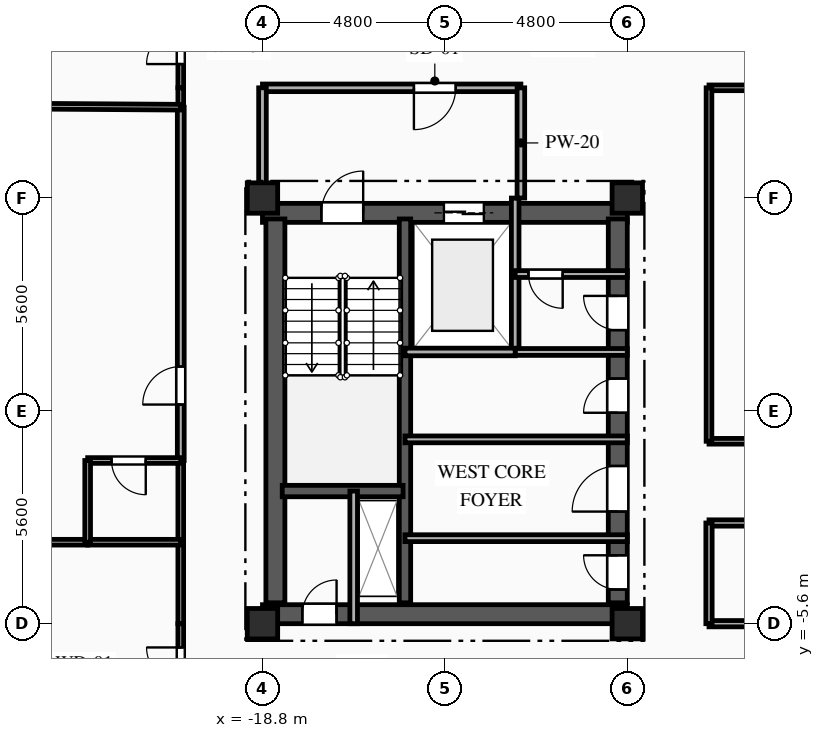
"""IFC4 building model, lengths in metres.
Left out: names, types, materials, properties, quantities, classifications, styles, units other than length and angle.
Written with IfcOpenShell. Run it as: python <this file> out.ifc"""

import sys

from ifc_helpers import new_model, si_unit, direction, frame, frame_2d, origin, origin_2d, place, context, subcontext, project, spatial, rectangle, extrude, element, fill, save


model = new_model("IFC4")
c1 = context("Model", 3, precision=1e-05, world=origin(), true_north=direction((0.0, 1.0)))
c2 = subcontext(c1, "Body", "Model", "MODEL_VIEW")
j1 = project(units=[si_unit("LENGTHUNIT", "METRE"), si_unit("PLANEANGLEUNIT", "RADIAN")], contexts=[c1])
p1 = place(None, origin())
s1 = spatial("IfcSite", under=j1, at=p1, CompositionType="ELEMENT")
p2 = place(p1, origin())
s2 = spatial("IfcBuilding", under=s1, at=p2, CompositionType="ELEMENT")
p3 = place(p2, frame((0.0, 0.0, 209.8)))
s3 = spatial("IfcBuildingStorey", under=s2, at=p3, CompositionType="ELEMENT", Elevation=209.8)
for number, where, z_axis, x_axis in (
    (1, (-18.8, -5.6, 0.0), (0.0, 0.0, 1.0), (1.0, 0.0, 0.0)),
    (2, (-18.8, 5.6, 0.0), (0.0, 0.0, 1.0), (1.0, 0.0, 0.0)),
    (3, (-9.2, -5.6, 0.0), (0.0, 0.0, 1.0), (1.0, 0.0, 0.0)),
    (4, (-9.2, 5.6, 0.0), (0.0, 0.0, 1.0), (1.0, 0.0, 0.0)),
):
    element("IfcColumn", number, at=place(p3, frame(where, z_axis=z_axis, x_axis=x_axis)), inside=s3, PredefinedType="COLUMN", context=c2, shape_type="SweptSolid", body=[
        extrude(rectangle(XDim=0.8, YDim=0.8, at=origin_2d()), origin(), (0.0, 0.0, 1.0), 3.35),
    ])
p4 = place(p3, frame((-18.8, 5.21, 0.0), z_axis=(0.0, 0.0, 1.0), x_axis=(1.0, 0.0, 0.0)))
e5 = element("IfcWall", 5, at=p4, inside=s3, PredefinedType="SHEAR", context=c2, shape_type="SweptSolid", body=[
    extrude(rectangle(XDim=9.6, YDim=0.5, at=frame_2d((4.8, 0.0))), origin(), (0.0, 0.0, 1.0), 3.04),
])
p5 = place(p4, frame((1.55, 0.0, 0.0)))
e6 = element("IfcOpeningElement", 6, at=p5, cuts=e5, PredefinedType="OPENING", context=c2, shape_type="SweptSolid", body=[
    extrude(rectangle(XDim=1.1, YDim=2.15, at=frame_2d((0.55, 1.075))), frame((0.0, 0.26, 0.0), z_axis=(0.0, -1.0, 0.0), x_axis=(1.0, 0.0, 0.0)), (0.0, 0.0, 1.0), 0.52),
])
p6 = place(p4, frame((4.775, 0.0, 0.0)))
e7 = element("IfcOpeningElement", 7, at=p6, cuts=e5, PredefinedType="OPENING", context=c2, shape_type="SweptSolid", body=[
    extrude(rectangle(XDim=1.05, YDim=2.1, at=frame_2d((0.525, 1.05))), frame((0.0, 0.26, 0.0), z_axis=(0.0, -1.0, 0.0), x_axis=(1.0, 0.0, 0.0)), (0.0, 0.0, 1.0), 0.52),
])
p7 = place(p3, frame((-18.8, -5.35, 0.0), z_axis=(0.0, 0.0, 1.0), x_axis=(1.0, 0.0, 0.0)))
e8 = element("IfcWall", 8, at=p7, inside=s3, PredefinedType="SHEAR", context=c2, shape_type="SweptSolid", body=[
    extrude(rectangle(XDim=9.6, YDim=0.5, at=frame_2d((4.8, 0.0))), origin(), (0.0, 0.0, 1.0), 3.04),
])
p8 = place(p7, frame((1.05, 0.0, 0.0)))
e9 = element("IfcOpeningElement", 9, at=p8, cuts=e8, PredefinedType="OPENING", context=c2, shape_type="SweptSolid", body=[
    extrude(rectangle(XDim=0.9, YDim=2.1, at=frame_2d((0.45, 1.05))), frame((0.0, 0.26, 0.0), z_axis=(0.0, -1.0, 0.0), x_axis=(1.0, 0.0, 0.0)), (0.0, 0.0, 1.0), 0.52),
])
p9 = place(p3, frame((-18.46, -5.05, 0.0), z_axis=(0.0, 0.0, 1.0), x_axis=(0.0, 1.0, 0.0)))
e10 = element("IfcWall", 10, at=p9, inside=s3, PredefinedType="SHEAR", context=c2, shape_type="SweptSolid", body=[
    extrude(rectangle(XDim=10.1, YDim=0.5, at=frame_2d((5.05, 0.0))), origin(), (0.0, 0.0, 1.0), 3.04),
])
p10 = place(p3, frame((-9.45, -5.05, 0.0), z_axis=(0.0, 0.0, 1.0), x_axis=(0.0, 1.0, 0.0)))
e11 = element("IfcWall", 11, at=p10, inside=s3, PredefinedType="SHEAR", context=c2, shape_type="SweptSolid", body=[
    extrude(rectangle(XDim=10.1, YDim=0.5, at=frame_2d((5.05, 0.0))), origin(), (0.0, 0.0, 1.0), 3.04),
])
p11 = place(p10, frame((7.175, 0.0, 0.0)))
e12 = element("IfcOpeningElement", 12, at=p11, cuts=e11, PredefinedType="OPENING", context=c2, shape_type="SweptSolid", body=[
    extrude(rectangle(XDim=0.9, YDim=2.1, at=frame_2d((0.45, 1.05))), frame((0.0, 0.26, 0.0), z_axis=(0.0, -1.0, 0.0), x_axis=(1.0, 0.0, 0.0)), (0.0, 0.0, 1.0), 0.52),
])
p12 = place(p10, frame((2.4, 0.0, 0.0)))
e13 = element("IfcOpeningElement", 13, at=p12, cuts=e11, PredefinedType="OPENING", context=c2, shape_type="SweptSolid", body=[
    extrude(rectangle(XDim=1.2, YDim=2.15, at=frame_2d((0.6, 1.075))), frame((0.0, 0.26, 0.0), z_axis=(0.0, -1.0, 0.0), x_axis=(1.0, 0.0, 0.0)), (0.0, 0.0, 1.0), 0.52),
])
p13 = place(p10, frame((0.35, 0.0, 0.0)))
e14 = element("IfcOpeningElement", 14, at=p13, cuts=e11, PredefinedType="OPENING", context=c2, shape_type="SweptSolid", body=[
    extrude(rectangle(XDim=0.9, YDim=2.1, at=frame_2d((0.45, 1.05))), frame((0.0, 0.26, 0.0), z_axis=(0.0, -1.0, 0.0), x_axis=(1.0, 0.0, 0.0)), (0.0, 0.0, 1.0), 0.52),
])
p14 = place(p10, frame((5.0, 0.0, 0.0)))
e15 = element("IfcOpeningElement", 15, at=p14, cuts=e11, PredefinedType="OPENING", context=c2, shape_type="SweptSolid", body=[
    extrude(rectangle(XDim=0.9, YDim=2.1, at=frame_2d((0.45, 1.05))), frame((0.0, 0.26, 0.0), z_axis=(0.0, -1.0, 0.0), x_axis=(1.0, 0.0, 0.0)), (0.0, 0.0, 1.0), 0.52),
])
p15 = place(p3, frame((-15.05, -5.05, 0.0), z_axis=(0.0, 0.0, 1.0), x_axis=(0.0, 1.0, 0.0)))
e16 = element("IfcWall", 16, at=p15, inside=s3, PredefinedType="SHEAR", context=c2, shape_type="SweptSolid", body=[
    extrude(rectangle(XDim=10.1, YDim=0.3, at=frame_2d((5.05, 0.0))), origin(), (0.0, 0.0, 1.0), 3.04),
])
p16 = place(p3, frame((-18.28, -2.11, 0.0), z_axis=(0.0, 0.0, 1.0), x_axis=(1.0, 0.0, 0.0)))
e17 = element("IfcWall", 17, at=p16, inside=s3, PredefinedType="SHEAR", context=c2, shape_type="SweptSolid", body=[
    extrude(rectangle(XDim=3.18, YDim=0.3, at=frame_2d((1.59, 0.0))), origin(), (0.0, 0.0, 1.0), 3.04),
])
p17 = place(p3, frame((-16.4, -5.6, 0.0), z_axis=(0.0, 0.0, 1.0), x_axis=(0.0, 1.0, 0.0)))
e18 = element("IfcWall", 18, at=p17, inside=s3, PredefinedType="PARTITIONING", context=c2, shape_type="SweptSolid", body=[
    extrude(rectangle(XDim=3.49, YDim=0.2, at=frame_2d((1.745, 0.0))), origin(), (0.0, 0.0, 1.0), 3.04),
])
p18 = place(p3, frame((-12.15, 1.55, 0.0), z_axis=(0.0, 0.0, 1.0), x_axis=(0.0, 1.0, 0.0)))
e19 = element("IfcWall", 19, at=p18, inside=s3, PredefinedType="PARTITIONING", context=c2, shape_type="SweptSolid", body=[
    extrude(rectangle(XDim=2.05, YDim=0.2, at=frame_2d((1.025, 0.0))), origin(), (0.0, 0.0, 1.0), 3.04),
])
p19 = place(p3, frame((-12.15, 3.6, 0.0), z_axis=(0.0, 0.0, 1.0), x_axis=(0.0, 1.0, 0.0)))
e20 = element("IfcWall", 20, at=p19, inside=s3, PredefinedType="PARTITIONING", context=c2, shape_type="SweptSolid", body=[
    extrude(rectangle(XDim=2.0, YDim=0.2, at=frame_2d((1.0, 0.0))), origin(), (0.0, 0.0, 1.0), 3.04),
])
p20 = place(p3, frame((-12.0, 8.5, 0.0), z_axis=(0.0, 0.0, 1.0), x_axis=(-1.0, 0.0, 0.0)))
e21 = element("IfcWall", 21, at=p20, inside=s3, PredefinedType="PARTITIONING", context=c2, shape_type="SweptSolid", body=[
    extrude(rectangle(XDim=6.8, YDim=0.2, at=frame_2d((3.4, 0.0))), origin(), (0.0, 0.0, 1.0), 3.04),
])
p21 = place(p20, frame((1.715, 0.0, 0.0)))
e22 = element("IfcOpeningElement", 22, at=p21, cuts=e21, PredefinedType="OPENING", context=c2, shape_type="SweptSolid", body=[
    extrude(rectangle(XDim=1.1, YDim=2.15, at=frame_2d((0.55, 1.075))), frame((0.0, 0.11, 0.0), z_axis=(0.0, -1.0, 0.0), x_axis=(1.0, 0.0, 0.0)), (0.0, 0.0, 1.0), 0.22),
])
p22 = place(p3, frame((-18.8, 8.5, 0.0), z_axis=(0.0, 0.0, 1.0), x_axis=(0.0, -1.0, 0.0)))
e23 = element("IfcWall", 23, at=p22, inside=s3, PredefinedType="PARTITIONING", context=c2, shape_type="SweptSolid", body=[
    extrude(rectangle(XDim=2.9, YDim=0.2, at=frame_2d((1.45, 0.0))), origin(), (0.0, 0.0, 1.0), 2.665),
])
p23 = place(p3, frame((-12.0, 5.6, 0.0), z_axis=(0.0, 0.0, 1.0), x_axis=(0.0, 1.0, 0.0)))
e24 = element("IfcWall", 24, at=p23, inside=s3, PredefinedType="PARTITIONING", context=c2, shape_type="SweptSolid", body=[
    extrude(rectangle(XDim=2.9, YDim=0.2, at=frame_2d((1.45, 0.0))), origin(), (0.0, 0.0, 1.0), 3.04),
])
p24 = place(p3, frame((-9.2, 3.6, 0.0), z_axis=(0.0, 0.0, 1.0), x_axis=(-1.0, 0.0, 0.0)))
e25 = element("IfcWall", 25, at=p24, inside=s3, PredefinedType="PARTITIONING", context=c2, shape_type="SweptSolid", body=[
    extrude(rectangle(XDim=2.95, YDim=0.18, at=frame_2d((1.475, 0.0))), origin(), (0.0, 0.0, 1.0), 3.04),
])
p25 = place(p24, frame((1.7, 0.0, 0.0)))
e26 = element("IfcOpeningElement", 26, at=p25, cuts=e25, PredefinedType="OPENING", context=c2, shape_type="SweptSolid", body=[
    extrude(rectangle(XDim=0.9, YDim=2.1, at=frame_2d((0.45, 1.05))), frame((0.0, 0.1, 0.0), z_axis=(0.0, -1.0, 0.0), x_axis=(1.0, 0.0, 0.0)), (0.0, 0.0, 1.0), 0.2),
])
p26 = place(p3, frame((-12.15, 1.55, 0.0), z_axis=(0.0, 0.0, 1.0), x_axis=(1.0, 0.0, 0.0)))
e27 = element("IfcWall", 27, at=p26, inside=s3, PredefinedType="PARTITIONING", context=c2, shape_type="SweptSolid", body=[
    extrude(rectangle(XDim=2.95, YDim=0.18, at=frame_2d((1.475, 0.0))), origin(), (0.0, 0.0, 1.0), 3.04),
])
p27 = place(p3, frame((-15.05, -3.35, 0.0), z_axis=(0.0, 0.0, 1.0), x_axis=(1.0, 0.0, 0.0)))
e28 = element("IfcWall", 28, at=p27, inside=s3, PredefinedType="PARTITIONING", context=c2, shape_type="SweptSolid", body=[
    extrude(rectangle(XDim=5.85, YDim=0.18, at=frame_2d((2.925, 0.0))), origin(), (0.0, 0.0, 1.0), 2.755),
])
p28 = place(p3, frame((-9.2, -0.75, 0.0), z_axis=(0.0, 0.0, 1.0), x_axis=(-1.0, 0.0, 0.0)))
e29 = element("IfcWall", 29, at=p28, inside=s3, PredefinedType="PARTITIONING", context=c2, shape_type="SweptSolid", body=[
    extrude(rectangle(XDim=5.85, YDim=0.18, at=frame_2d((2.925, 0.0))), origin(), (0.0, 0.0, 1.0), 3.04),
])
p29 = place(p3, frame((-20.95, 8.5, 0.0), z_axis=(0.0, 0.0, 1.0), x_axis=(0.0, 1.0, 0.0)))
e30 = element("IfcWall", 30, at=p29, inside=s3, PredefinedType="PARTITIONING", context=c2, shape_type="SweptSolid", body=[
    extrude(rectangle(XDim=2.15, YDim=0.15, at=frame_2d((1.075, 0.0))), origin(), (0.0, 0.0, 1.0), 3.04),
])
p30 = place(p29, frame((0.625, 0.0, 0.0)))
e31 = element("IfcOpeningElement", 31, at=p30, cuts=e30, PredefinedType="OPENING", context=c2, shape_type="SweptSolid", body=[
    extrude(rectangle(XDim=0.9, YDim=2.1, at=frame_2d((0.45, 1.05))), frame((0.0, 0.085, 0.0), z_axis=(0.0, -1.0, 0.0), x_axis=(1.0, 0.0, 0.0)), (0.0, 0.0, 1.0), 0.17),
])
p31 = place(p3, frame((0.0, 8.5, 0.0), z_axis=(0.0, 0.0, 1.0), x_axis=(-1.0, 0.0, 0.0)))
e32 = element("IfcWall", 32, at=p31, inside=s3, PredefinedType="PARTITIONING", context=c2, shape_type="SweptSolid", body=[
    extrude(rectangle(XDim=7.05, YDim=0.15, at=frame_2d((3.525, 0.0))), origin(), (0.0, 0.0, 1.0), 3.04),
])
p32 = place(p3, frame((-20.95, -7.75, 0.0), z_axis=(0.0, 0.0, 1.0), x_axis=(0.0, 1.0, 0.0)))
e33 = element("IfcWall", 33, at=p32, inside=s3, PredefinedType="PARTITIONING", context=c2, shape_type="SweptSolid", body=[
    extrude(rectangle(XDim=2.15, YDim=0.15, at=frame_2d((1.075, 0.0))), origin(), (0.0, 0.0, 1.0), 3.04),
])
p33 = place(p32, frame((0.625, 0.0, 0.0)))
e34 = element("IfcOpeningElement", 34, at=p33, cuts=e33, PredefinedType="OPENING", context=c2, shape_type="SweptSolid", body=[
    extrude(rectangle(XDim=0.9, YDim=2.1, at=frame_2d((0.45, 1.05))), frame((0.0, 0.085, 0.0), z_axis=(0.0, -1.0, 0.0), x_axis=(1.0, 0.0, 0.0)), (0.0, 0.0, 1.0), 0.17),
])
p34 = place(p3, frame((-7.05, -5.6, 0.0), z_axis=(0.0, 0.0, 1.0), x_axis=(1.0, 0.0, 0.0)))
e35 = element("IfcWall", 35, at=p34, inside=s3, PredefinedType="PARTITIONING", context=c2, shape_type="SweptSolid", body=[
    extrude(rectangle(XDim=7.05, YDim=0.165, at=frame_2d((3.525, 0.0))), origin(), (0.0, 0.0, 1.0), 2.525),
])
p35 = place(p3, frame((-20.95, -5.6, 0.0), z_axis=(0.0, 0.0, 1.0), x_axis=(0.0, 1.0, 0.0)))
e36 = element("IfcWall", 36, at=p35, inside=s3, PredefinedType="PARTITIONING", context=c2, shape_type="SweptSolid", body=[
    extrude(rectangle(XDim=2.144, YDim=0.15, at=frame_2d((1.072, 0.0))), origin(), (0.0, 0.0, 1.0), 3.04),
])
p36 = place(p3, frame((-20.95, -1.306, 0.0), z_axis=(0.0, 0.0, 1.0), x_axis=(0.0, 1.0, 0.0)))
e37 = element("IfcWall", 37, at=p36, inside=s3, PredefinedType="PARTITIONING", context=c2, shape_type="SweptSolid", body=[
    extrude(rectangle(XDim=9.296, YDim=0.18, at=frame_2d((4.648, 0.0))), origin(), (0.0, 0.0, 1.0), 3.04),
])
p37 = place(p36, frame((1.472, 0.0, 0.0)))
e38 = element("IfcOpeningElement", 38, at=p37, cuts=e37, PredefinedType="OPENING", context=c2, shape_type="SweptSolid", body=[
    extrude(rectangle(XDim=1.0, YDim=2.15, at=frame_2d((0.5, 1.075))), frame((0.0, 0.1, 0.0), z_axis=(0.0, -1.0, 0.0), x_axis=(1.0, 0.0, 0.0)), (0.0, 0.0, 1.0), 0.2),
])
p38 = place(p3, frame((-20.95, -3.456, 0.0), z_axis=(0.0, 0.0, 1.0), x_axis=(0.0, 1.0, 0.0)))
e39 = element("IfcWall", 39, at=p38, inside=s3, PredefinedType="PLUMBINGWALL", context=c2, shape_type="SweptSolid", body=[
    extrude(rectangle(XDim=2.15, YDim=0.15, at=frame_2d((1.075, 0.0))), origin(), (0.0, 0.0, 1.0), 3.04),
])
p39 = place(p3, frame((-20.95, 7.99, 0.0), z_axis=(0.0, 0.0, 1.0), x_axis=(0.0, 1.0, 0.0)))
e40 = element("IfcWall", 40, at=p39, inside=s3, PredefinedType="PARTITIONING", context=c2, shape_type="SweptSolid", body=[
    extrude(rectangle(XDim=0.51, YDim=0.15, at=frame_2d((0.255, 0.0))), origin(), (0.0, 0.0, 1.0), 3.04),
])
p40 = place(p3, frame((-7.05, -0.8, 0.0), z_axis=(0.0, 0.0, 1.0), x_axis=(1.0, 0.0, 0.0)))
e41 = element("IfcWall", 41, at=p40, inside=s3, PredefinedType="PARTITIONING", context=c2, shape_type="SweptSolid", body=[
    extrude(rectangle(XDim=14.1, YDim=0.15, at=frame_2d((7.05, 0.0))), origin(), (0.0, 0.0, 1.0), 3.04),
])
p41 = place(p40, frame((6.525, 0.0, 0.0)))
e42 = element("IfcOpeningElement", 42, at=p41, cuts=e41, PredefinedType="OPENING", context=c2, shape_type="SweptSolid", body=[
    extrude(rectangle(XDim=1.05, YDim=2.15, at=frame_2d((0.525, 1.075))), frame((0.0, 0.085, 0.0), z_axis=(0.0, -1.0, 0.0), x_axis=(1.0, 0.0, 0.0)), (0.0, 0.0, 1.0), 0.17),
])
p42 = place(p3, frame((7.05, -2.95, 0.0), z_axis=(0.0, 0.0, 1.0), x_axis=(-1.0, 0.0, 0.0)))
e43 = element("IfcWall", 43, at=p42, inside=s3, PredefinedType="PARTITIONING", context=c2, shape_type="SweptSolid", body=[
    extrude(rectangle(XDim=14.1, YDim=0.165, at=frame_2d((7.05, 0.0))), origin(), (0.0, 0.0, 1.0), 3.04),
])
p43 = place(p42, frame((6.475, 0.0, 0.0)))
e44 = element("IfcOpeningElement", 44, at=p43, cuts=e43, PredefinedType="OPENING", context=c2, shape_type="SweptSolid", body=[
    extrude(rectangle(XDim=1.15, YDim=2.15, at=frame_2d((0.575, 1.075))), frame((0.0, 0.093, 0.0), z_axis=(0.0, -1.0, 0.0), x_axis=(1.0, 0.0, 0.0)), (0.0, 0.0, 1.0), 0.185),
])
p44 = place(p3, frame((-7.05, 8.5, 0.0), z_axis=(0.0, 0.0, 1.0), x_axis=(0.0, -1.0, 0.0)))
e45 = element("IfcWall", 45, at=p44, inside=s3, PredefinedType="PARTITIONING", context=c2, shape_type="SweptSolid", body=[
    extrude(rectangle(XDim=9.3, YDim=0.15, at=frame_2d((4.65, 0.0))), origin(), (0.0, 0.0, 1.0), 3.04),
])
p45 = place(p3, frame((-7.05, -2.95, 0.0), z_axis=(0.0, 0.0, 1.0), x_axis=(0.0, -1.0, 0.0)))
e46 = element("IfcWall", 46, at=p45, inside=s3, PredefinedType="PARTITIONING", context=c2, shape_type="SweptSolid", body=[
    extrude(rectangle(XDim=2.65, YDim=0.165, at=frame_2d((1.325, 0.0))), origin(), (0.0, 0.0, 1.0), 3.04),
])
p46 = place(p3, frame((-24.976, -3.456, 0.0), z_axis=(0.0, 0.0, 1.0), x_axis=(1.0, 0.0, 0.0)))
e47 = element("IfcWall", 47, at=p46, inside=s3, PredefinedType="PARTITIONING", context=c2, shape_type="SweptSolid", body=[
    extrude(rectangle(XDim=1.576, YDim=0.15, at=frame_2d((0.788, 0.0))), origin(), (0.0, 0.0, 1.0), 3.04),
])
p47 = place(p3, frame((-23.4, -3.456, 0.0), z_axis=(0.0, 0.0, 1.0), x_axis=(1.0, 0.0, 0.0)))
e48 = element("IfcWall", 48, at=p47, inside=s3, PredefinedType="PLUMBINGWALL", context=c2, shape_type="SweptSolid", body=[
    extrude(rectangle(XDim=2.45, YDim=0.15, at=frame_2d((1.225, 0.0))), origin(), (0.0, 0.0, 1.0), 3.04),
])
p48 = place(p3, frame((-20.95, -1.306, 0.0), z_axis=(0.0, 0.0, 1.0), x_axis=(-1.0, 0.0, 0.0)))
e49 = element("IfcWall", 49, at=p48, inside=s3, PredefinedType="PLUMBINGWALL", context=c2, shape_type="SweptSolid", body=[
    extrude(rectangle(XDim=2.45, YDim=0.15, at=frame_2d((1.225, 0.0))), origin(), (0.0, 0.0, 1.0), 3.04),
])
p49 = place(p48, frame((0.921, 0.0, 0.0)))
e50 = element("IfcOpeningElement", 50, at=p49, cuts=e49, PredefinedType="OPENING", context=c2, shape_type="SweptSolid", body=[
    extrude(rectangle(XDim=0.9, YDim=2.1, at=frame_2d((0.45, 1.05))), frame((0.0, 0.085, 0.0), z_axis=(0.0, -1.0, 0.0), x_axis=(1.0, 0.0, 0.0)), (0.0, 0.0, 1.0), 0.17),
])
p50 = place(p3, frame((-23.4, -1.306, 0.0), z_axis=(0.0, 0.0, 1.0), x_axis=(0.0, -1.0, 0.0)))
e51 = element("IfcWall", 51, at=p50, inside=s3, PredefinedType="PLUMBINGWALL", context=c2, shape_type="SweptSolid", body=[
    extrude(rectangle(XDim=2.15, YDim=0.15, at=frame_2d((1.075, 0.0))), origin(), (0.0, 0.0, 1.0), 2.695),
])
p51 = place(p3, frame((-27.419, 8.034, 0.0), z_axis=(0.0, 0.0, 1.0), x_axis=(0.999976928608, -0.006792808784, 0.0)))
e52 = element("IfcWall", 52, at=p51, inside=s3, PredefinedType="PARTITIONING", context=c2, shape_type="SweptSolid", body=[
    extrude(rectangle(XDim=6.469, YDim=0.15, at=frame_2d((3.235, 0.0))), origin(), (0.0, 0.0, 1.0), 3.04),
])
p52 = place(p3, frame((-15.05, 1.55, 0.0), z_axis=(0.0, 0.0, 1.0), x_axis=(1.0, 0.0, 0.0)))
e53 = element("IfcWall", 53, at=p52, inside=s3, PredefinedType="PARTITIONING", context=c2, shape_type="SweptSolid", body=[
    extrude(rectangle(XDim=2.9, YDim=0.2, at=frame_2d((1.45, 0.0))), origin(), (0.0, 0.0, 1.0), 3.04),
])
p53 = place(p5, origin())
e54 = element("IfcDoor", 54, at=p53, inside=s3, OperationType="SINGLE_SWING_RIGHT", PredefinedType="DOOR", context=c2, shape_type="SweptSolid", body=[
    extrude(rectangle(XDim=1.1, YDim=2.15, at=frame_2d((0.55, 1.075))), frame((0.0, 0.025, 0.0), z_axis=(0.0, -1.0, 0.0), x_axis=(1.0, 0.0, 0.0)), (0.0, 0.0, 1.0), 0.05),
])
fill(e6, e54)
p54 = place(p6, origin())
e55 = element("IfcDoor", 55, at=p54, inside=s3, OperationType="DOUBLE_DOOR_SLIDING", PredefinedType="DOOR", context=c2, shape_type="SweptSolid", body=[
    extrude(rectangle(XDim=1.05, YDim=2.1, at=frame_2d((0.525, 1.05))), frame((0.0, 0.025, 0.0), z_axis=(0.0, -1.0, 0.0), x_axis=(1.0, 0.0, 0.0)), (0.0, 0.0, 1.0), 0.05),
])
fill(e7, e55)
p55 = place(p8, origin())
e56 = element("IfcDoor", 56, at=p55, inside=s3, OperationType="SINGLE_SWING_RIGHT", PredefinedType="DOOR", context=c2, shape_type="SweptSolid", body=[
    extrude(rectangle(XDim=0.9, YDim=2.1, at=frame_2d((0.45, 1.05))), frame((0.0, 0.025, 0.0), z_axis=(0.0, -1.0, 0.0), x_axis=(1.0, 0.0, 0.0)), (0.0, 0.0, 1.0), 0.05),
])
fill(e9, e56)
p56 = place(p21, origin())
e57 = element("IfcDoor", 57, at=p56, inside=s3, OperationType="SINGLE_SWING_RIGHT", PredefinedType="DOOR", context=c2, shape_type="SweptSolid", body=[
    extrude(rectangle(XDim=1.1, YDim=2.15, at=frame_2d((0.55, 1.075))), frame((0.0, 0.025, 0.0), z_axis=(0.0, -1.0, 0.0), x_axis=(1.0, 0.0, 0.0)), (0.0, 0.0, 1.0), 0.05),
])
fill(e22, e57)
p57 = place(p25, origin())
e58 = element("IfcDoor", 58, at=p57, inside=s3, OperationType="SINGLE_SWING_LEFT", PredefinedType="DOOR", context=c2, shape_type="SweptSolid", body=[
    extrude(rectangle(XDim=0.9, YDim=2.1, at=frame_2d((0.45, 1.05))), frame((0.0, 0.025, 0.0), z_axis=(0.0, -1.0, 0.0), x_axis=(1.0, 0.0, 0.0)), (0.0, 0.0, 1.0), 0.05),
])
fill(e26, e58)
p58 = place(p11, origin())
e59 = element("IfcDoor", 59, at=p58, inside=s3, OperationType="SINGLE_SWING_RIGHT", PredefinedType="DOOR", context=c2, shape_type="SweptSolid", body=[
    extrude(rectangle(XDim=0.9, YDim=2.1, at=frame_2d((0.45, 1.05))), frame((0.0, 0.025, 0.0), z_axis=(0.0, -1.0, 0.0), x_axis=(1.0, 0.0, 0.0)), (0.0, 0.0, 1.0), 0.05),
])
fill(e12, e59)
p59 = place(p12, origin())
e60 = element("IfcDoor", 60, at=p59, inside=s3, OperationType="SINGLE_SWING_LEFT", PredefinedType="DOOR", context=c2, shape_type="SweptSolid", body=[
    extrude(rectangle(XDim=1.2, YDim=2.15, at=frame_2d((0.6, 1.075))), frame((0.0, 0.025, 0.0), z_axis=(0.0, -1.0, 0.0), x_axis=(1.0, 0.0, 0.0)), (0.0, 0.0, 1.0), 0.05),
])
fill(e13, e60)
p60 = place(p13, origin())
e61 = element("IfcDoor", 61, at=p60, inside=s3, OperationType="SINGLE_SWING_RIGHT", PredefinedType="DOOR", context=c2, shape_type="SweptSolid", body=[
    extrude(rectangle(XDim=0.9, YDim=2.1, at=frame_2d((0.45, 1.05))), frame((0.0, 0.025, 0.0), z_axis=(0.0, -1.0, 0.0), x_axis=(1.0, 0.0, 0.0)), (0.0, 0.0, 1.0), 0.05),
])
fill(e14, e61)
p61 = place(p14, origin())
e62 = element("IfcDoor", 62, at=p61, inside=s3, OperationType="SINGLE_SWING_LEFT", PredefinedType="DOOR", context=c2, shape_type="SweptSolid", body=[
    extrude(rectangle(XDim=0.9, YDim=2.1, at=frame_2d((0.45, 1.05))), frame((0.0, 0.025, 0.0), z_axis=(0.0, -1.0, 0.0), x_axis=(1.0, 0.0, 0.0)), (0.0, 0.0, 1.0), 0.05),
])
fill(e15, e62)
p62 = place(p30, origin())
e63 = element("IfcDoor", 63, at=p62, inside=s3, OperationType="SINGLE_SWING_LEFT", PredefinedType="DOOR", context=c2, shape_type="SweptSolid", body=[
    extrude(rectangle(XDim=0.9, YDim=2.1, at=frame_2d((0.45, 1.05))), frame((0.0, 0.025, 0.0), z_axis=(0.0, -1.0, 0.0), x_axis=(1.0, 0.0, 0.0)), (0.0, 0.0, 1.0), 0.05),
])
fill(e31, e63)
p63 = place(p33, origin())
e64 = element("IfcDoor", 64, at=p63, inside=s3, OperationType="SINGLE_SWING_RIGHT", PredefinedType="DOOR", context=c2, shape_type="SweptSolid", body=[
    extrude(rectangle(XDim=0.9, YDim=2.1, at=frame_2d((0.45, 1.05))), frame((0.0, 0.025, 0.0), z_axis=(0.0, -1.0, 0.0), x_axis=(1.0, 0.0, 0.0)), (0.0, 0.0, 1.0), 0.05),
])
fill(e34, e64)
p64 = place(p37, origin())
e65 = element("IfcDoor", 65, at=p64, inside=s3, OperationType="SINGLE_SWING_LEFT", PredefinedType="DOOR", context=c2, shape_type="SweptSolid", body=[
    extrude(rectangle(XDim=1.0, YDim=2.15, at=frame_2d((0.5, 1.075))), frame((0.0, 0.025, 0.0), z_axis=(0.0, -1.0, 0.0), x_axis=(1.0, 0.0, 0.0)), (0.0, 0.0, 1.0), 0.05),
])
fill(e38, e65)
p65 = place(p49, origin())
e66 = element("IfcDoor", 66, at=p65, inside=s3, OperationType="SINGLE_SWING_LEFT", PredefinedType="DOOR", context=c2, shape_type="SweptSolid", body=[
    extrude(rectangle(XDim=0.9, YDim=2.1, at=frame_2d((0.45, 1.05))), frame((0.0, 0.025, 0.0), z_axis=(0.0, -1.0, 0.0), x_axis=(1.0, 0.0, 0.0)), (0.0, 0.0, 1.0), 0.05),
])
fill(e50, e66)
save(model, sys.argv[1])
